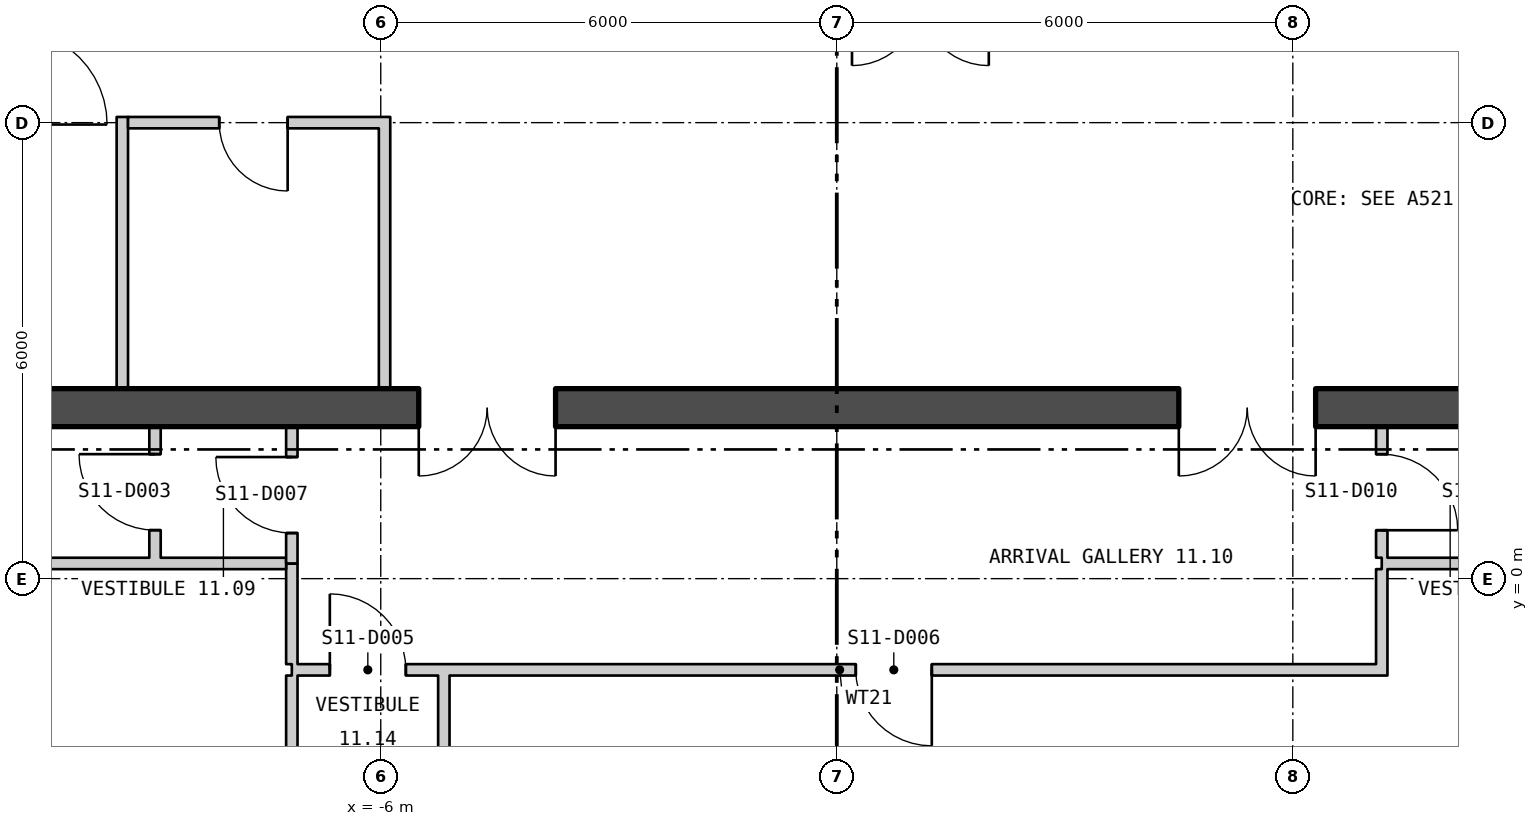
"""IFC4 building model, lengths in metres.
Left out: names, types, materials, properties, quantities, classifications, styles, units other than length and angle.
Written with IfcOpenShell. Run it as: python <this file> out.ifc"""

import sys

from ifc_helpers import new_model, si_unit, direction, frame, frame_2d, origin, place, context, subcontext, project, spatial, polyline, rectangle, outline, extrude, element, fill, save


model = new_model("IFC4")
c1 = context("Model", 3, precision=1e-05, world=origin(), true_north=direction((0.0, 1.0)))
c2 = subcontext(c1, "Body", "Model", "MODEL_VIEW")
j1 = project(units=[si_unit("LENGTHUNIT", "METRE"), si_unit("PLANEANGLEUNIT", "RADIAN")], contexts=[c1])
p1 = place(None, origin())
s1 = spatial("IfcSite", under=j1, at=p1, CompositionType="ELEMENT")
p2 = place(p1, origin())
s2 = spatial("IfcBuilding", under=s1, at=p2, CompositionType="ELEMENT")
p3 = place(p2, frame((0.0, 0.0, 151.5)))
s3 = spatial("IfcBuildingStorey", under=s2, at=p3, CompositionType="ELEMENT", Elevation=151.5)
p4 = place(p3, frame((-27.075, 12.683, -0.18), z_axis=(0.0, 0.0, 1.0), x_axis=(0.500000141277, -0.866025322218, 0.0)))
e1 = element("IfcWall", 1, at=p4, inside=s3, PredefinedType="SOLIDWALL", context=c2, shape_type="SweptSolid", body=[
    extrude(outline(polyline([(-0.13, -0.225), (45.86, -0.225), (45.6, 0.225), (0.13, 0.225), (-0.13, -0.225)])), origin(), (0.0, 0.0, 1.0), 3.68),
])
p5 = place(p4, frame((1.424, 0.0, 1.08)))
e2 = element("IfcOpeningElement", 2, at=p5, cuts=e1, PredefinedType="OPENING", context=c2, shape_type="SweptSolid", body=[
    extrude(rectangle(XDim=2.4, YDim=2.0, at=frame_2d((1.2, 1.0))), frame((0.0, 0.235, 0.0), z_axis=(0.0, -1.0, 0.0), x_axis=(1.0, 0.0, 0.0)), (0.0, 0.0, 1.0), 0.47),
])
p6 = place(p4, frame((5.892, 0.0, 1.08)))
e3 = element("IfcOpeningElement", 3, at=p6, cuts=e1, PredefinedType="OPENING", context=c2, shape_type="SweptSolid", body=[
    extrude(rectangle(XDim=2.4, YDim=2.0, at=frame_2d((1.2, 1.0))), frame((0.0, 0.235, 0.0), z_axis=(0.0, -1.0, 0.0), x_axis=(1.0, 0.0, 0.0)), (0.0, 0.0, 1.0), 0.47),
])
p7 = place(p4, frame((10.399, 0.0, 1.08)))
e4 = element("IfcOpeningElement", 4, at=p7, cuts=e1, PredefinedType="OPENING", context=c2, shape_type="SweptSolid", body=[
    extrude(rectangle(XDim=2.4, YDim=2.0, at=frame_2d((1.2, 1.0))), frame((0.0, 0.235, 0.0), z_axis=(0.0, -1.0, 0.0), x_axis=(1.0, 0.0, 0.0)), (0.0, 0.0, 1.0), 0.47),
])
p8 = place(p4, frame((14.905, 0.0, 1.08)))
e5 = element("IfcOpeningElement", 5, at=p8, cuts=e1, PredefinedType="OPENING", context=c2, shape_type="SweptSolid", body=[
    extrude(rectangle(XDim=2.4, YDim=2.0, at=frame_2d((1.2, 1.0))), frame((0.0, 0.235, 0.0), z_axis=(0.0, -1.0, 0.0), x_axis=(1.0, 0.0, 0.0)), (0.0, 0.0, 1.0), 0.47),
])
p9 = place(p4, frame((19.412, 0.0, 1.08)))
e6 = element("IfcOpeningElement", 6, at=p9, cuts=e1, PredefinedType="OPENING", context=c2, shape_type="SweptSolid", body=[
    extrude(rectangle(XDim=2.4, YDim=2.0, at=frame_2d((1.2, 1.0))), frame((0.0, 0.235, 0.0), z_axis=(0.0, -1.0, 0.0), x_axis=(1.0, 0.0, 0.0)), (0.0, 0.0, 1.0), 0.47),
])
p10 = place(p4, frame((23.918, 0.0, 1.08)))
e7 = element("IfcOpeningElement", 7, at=p10, cuts=e1, PredefinedType="OPENING", context=c2, shape_type="SweptSolid", body=[
    extrude(rectangle(XDim=2.4, YDim=2.0, at=frame_2d((1.2, 1.0))), frame((0.0, 0.235, 0.0), z_axis=(0.0, -1.0, 0.0), x_axis=(1.0, 0.0, 0.0)), (0.0, 0.0, 1.0), 0.47),
])
p11 = place(p4, frame((28.425, 0.0, 1.08)))
e8 = element("IfcOpeningElement", 8, at=p11, cuts=e1, PredefinedType="OPENING", context=c2, shape_type="SweptSolid", body=[
    extrude(rectangle(XDim=2.4, YDim=2.0, at=frame_2d((1.2, 1.0))), frame((0.0, 0.235, 0.0), z_axis=(0.0, -1.0, 0.0), x_axis=(1.0, 0.0, 0.0)), (0.0, 0.0, 1.0), 0.47),
])
p12 = place(p4, frame((32.932, 0.0, 1.08)))
e9 = element("IfcOpeningElement", 9, at=p12, cuts=e1, PredefinedType="OPENING", context=c2, shape_type="SweptSolid", body=[
    extrude(rectangle(XDim=2.4, YDim=2.0, at=frame_2d((1.2, 1.0))), frame((0.0, 0.235, 0.0), z_axis=(0.0, -1.0, 0.0), x_axis=(1.0, 0.0, 0.0)), (0.0, 0.0, 1.0), 0.47),
])
p13 = place(p4, frame((37.438, 0.0, 1.08)))
e10 = element("IfcOpeningElement", 10, at=p13, cuts=e1, PredefinedType="OPENING", context=c2, shape_type="SweptSolid", body=[
    extrude(rectangle(XDim=2.4, YDim=2.0, at=frame_2d((1.2, 1.0))), frame((0.0, 0.235, 0.0), z_axis=(0.0, -1.0, 0.0), x_axis=(1.0, 0.0, 0.0)), (0.0, 0.0, 1.0), 0.47),
])
p14 = place(p4, frame((41.907, 0.0, 1.08)))
e11 = element("IfcOpeningElement", 11, at=p14, cuts=e1, PredefinedType="OPENING", context=c2, shape_type="SweptSolid", body=[
    extrude(rectangle(XDim=2.4, YDim=2.0, at=frame_2d((1.2, 1.0))), frame((0.0, 0.235, 0.0), z_axis=(0.0, -1.0, 0.0), x_axis=(1.0, 0.0, 0.0)), (0.0, 0.0, 1.0), 0.47),
])
p15 = place(p3, frame((4.21, -26.921, -0.18), z_axis=(0.0, 0.0, 1.0), x_axis=(0.500000141277, 0.866025322218, 0.0)))
e12 = element("IfcWall", 12, at=p15, inside=s3, PredefinedType="SOLIDWALL", context=c2, shape_type="SweptSolid", body=[
    extrude(outline(polyline([(-0.13, -0.225), (45.86, -0.225), (45.6, 0.225), (0.13, 0.225), (-0.13, -0.225)])), origin(), (0.0, 0.0, 1.0), 3.68),
])
p16 = place(p15, frame((1.424, 0.0, 1.08)))
e13 = element("IfcOpeningElement", 13, at=p16, cuts=e12, PredefinedType="OPENING", context=c2, shape_type="SweptSolid", body=[
    extrude(rectangle(XDim=2.4, YDim=2.0, at=frame_2d((1.2, 1.0))), frame((0.0, 0.235, 0.0), z_axis=(0.0, -1.0, 0.0), x_axis=(1.0, 0.0, 0.0)), (0.0, 0.0, 1.0), 0.47),
])
p17 = place(p15, frame((5.892, 0.0, 1.08)))
e14 = element("IfcOpeningElement", 14, at=p17, cuts=e12, PredefinedType="OPENING", context=c2, shape_type="SweptSolid", body=[
    extrude(rectangle(XDim=2.4, YDim=2.0, at=frame_2d((1.2, 1.0))), frame((0.0, 0.235, 0.0), z_axis=(0.0, -1.0, 0.0), x_axis=(1.0, 0.0, 0.0)), (0.0, 0.0, 1.0), 0.47),
])
p18 = place(p15, frame((10.399, 0.0, 1.08)))
e15 = element("IfcOpeningElement", 15, at=p18, cuts=e12, PredefinedType="OPENING", context=c2, shape_type="SweptSolid", body=[
    extrude(rectangle(XDim=2.4, YDim=2.0, at=frame_2d((1.2, 1.0))), frame((0.0, 0.235, 0.0), z_axis=(0.0, -1.0, 0.0), x_axis=(1.0, 0.0, 0.0)), (0.0, 0.0, 1.0), 0.47),
])
p19 = place(p15, frame((14.905, 0.0, 1.08)))
e16 = element("IfcOpeningElement", 16, at=p19, cuts=e12, PredefinedType="OPENING", context=c2, shape_type="SweptSolid", body=[
    extrude(rectangle(XDim=2.4, YDim=2.0, at=frame_2d((1.2, 1.0))), frame((0.0, 0.235, 0.0), z_axis=(0.0, -1.0, 0.0), x_axis=(1.0, 0.0, 0.0)), (0.0, 0.0, 1.0), 0.47),
])
p20 = place(p15, frame((19.412, 0.0, 1.08)))
e17 = element("IfcOpeningElement", 17, at=p20, cuts=e12, PredefinedType="OPENING", context=c2, shape_type="SweptSolid", body=[
    extrude(rectangle(XDim=2.4, YDim=2.0, at=frame_2d((1.2, 1.0))), frame((0.0, 0.235, 0.0), z_axis=(0.0, -1.0, 0.0), x_axis=(1.0, 0.0, 0.0)), (0.0, 0.0, 1.0), 0.47),
])
p21 = place(p15, frame((23.918, 0.0, 1.08)))
e18 = element("IfcOpeningElement", 18, at=p21, cuts=e12, PredefinedType="OPENING", context=c2, shape_type="SweptSolid", body=[
    extrude(rectangle(XDim=2.4, YDim=2.0, at=frame_2d((1.2, 1.0))), frame((0.0, 0.235, 0.0), z_axis=(0.0, -1.0, 0.0), x_axis=(1.0, 0.0, 0.0)), (0.0, 0.0, 1.0), 0.47),
])
p22 = place(p15, frame((37.438, 0.0, 1.08)))
e19 = element("IfcOpeningElement", 19, at=p22, cuts=e12, PredefinedType="OPENING", context=c2, shape_type="SweptSolid", body=[
    extrude(rectangle(XDim=2.4, YDim=2.0, at=frame_2d((1.2, 1.0))), frame((0.0, 0.235, 0.0), z_axis=(0.0, -1.0, 0.0), x_axis=(1.0, 0.0, 0.0)), (0.0, 0.0, 1.0), 0.47),
])
p23 = place(p15, frame((41.907, 0.0, 1.08)))
e20 = element("IfcOpeningElement", 20, at=p23, cuts=e12, PredefinedType="OPENING", context=c2, shape_type="SweptSolid", body=[
    extrude(rectangle(XDim=2.4, YDim=2.0, at=frame_2d((1.2, 1.0))), frame((0.0, 0.235, 0.0), z_axis=(0.0, -1.0, 0.0), x_axis=(1.0, 0.0, 0.0)), (0.0, 0.0, 1.0), 0.47),
])
p24 = place(p3, frame((-16.2, 2.25, 0.0), z_axis=(0.0, 0.0, 1.0), x_axis=(1.0, 0.0, 0.0)))
e21 = element("IfcWall", 21, at=p24, inside=s3, PredefinedType="SHEAR", context=c2, shape_type="SweptSolid", body=[
    extrude(rectangle(XDim=32.4, YDim=0.5, at=frame_2d((16.2, 0.0))), origin(), (0.0, 0.0, 1.0), 3.7),
])
p25 = place(p24, frame((10.7, 0.0, 0.0)))
e22 = element("IfcOpeningElement", 22, at=p25, cuts=e21, PredefinedType="OPENING", context=c2, shape_type="SweptSolid", body=[
    extrude(rectangle(XDim=1.8, YDim=2.4, at=frame_2d((0.9, 1.2))), frame((0.0, 0.26, 0.0), z_axis=(0.0, -1.0, 0.0), x_axis=(1.0, 0.0, 0.0)), (0.0, 0.0, 1.0), 0.52),
])
p26 = place(p24, frame((20.7, 0.0, 0.0)))
e23 = element("IfcOpeningElement", 23, at=p26, cuts=e21, PredefinedType="OPENING", context=c2, shape_type="SweptSolid", body=[
    extrude(rectangle(XDim=1.8, YDim=2.4, at=frame_2d((0.9, 1.2))), frame((0.0, 0.26, 0.0), z_axis=(0.0, -1.0, 0.0), x_axis=(1.0, 0.0, 0.0)), (0.0, 0.0, 1.0), 0.52),
])
for number, where, z_axis, x_axis in (
    (24, (-9.4, 2.5, 0.0), (0.0, 0.0, 1.0), (0.0, 1.0, 0.0)),
    (25, (-5.95, 2.5, 0.0), (0.0, 0.0, 1.0), (0.0, 1.0, 0.0)),
):
    element("IfcWall", number, at=place(p3, frame(where, z_axis=z_axis, x_axis=x_axis)), inside=s3, PredefinedType="PARTITIONING", context=c2, shape_type="SweptSolid", body=[
        extrude(rectangle(XDim=3.575, YDim=0.15, at=frame_2d((1.788, 0.0))), origin(), (0.0, 0.0, 1.0), 3.7),
    ])
p27 = place(p3, frame((-9.325, 6.0, 0.0), z_axis=(0.0, 0.0, 1.0), x_axis=(1.0, 0.0, 0.0)))
e26 = element("IfcWall", 26, at=p27, inside=s3, PredefinedType="PARTITIONING", context=c2, shape_type="SweptSolid", body=[
    extrude(rectangle(XDim=3.3, YDim=0.15, at=frame_2d((1.65, 0.0))), origin(), (0.0, 0.0, 1.0), 3.7),
])
p28 = place(p27, frame((1.2, 0.0, 0.0)))
e27 = element("IfcOpeningElement", 27, at=p28, cuts=e26, PredefinedType="OPENING", context=c2, shape_type="SweptSolid", body=[
    extrude(rectangle(XDim=0.9, YDim=2.1, at=frame_2d((0.45, 1.05))), frame((0.0, 0.085, 0.0), z_axis=(0.0, -1.0, 0.0), x_axis=(1.0, 0.0, 0.0)), (0.0, 0.0, 1.0), 0.17),
])
p29 = place(p3, frame((-17.925, 0.2, 0.0), z_axis=(0.0, 0.0, 1.0), x_axis=(1.0, 0.0, 0.0)))
e28 = element("IfcWall", 28, at=p29, inside=s3, PredefinedType="PARTITIONING", context=c2, shape_type="SweptSolid", body=[
    extrude(rectangle(XDim=10.68, YDim=0.15, at=frame_2d((5.34, 0.0))), origin(), (0.0, 0.0, 1.0), 3.7),
])
p30 = place(p29, frame((0.312, 0.0, 0.0)))
e29 = element("IfcOpeningElement", 29, at=p30, cuts=e28, PredefinedType="OPENING", context=c2, shape_type="SweptSolid", body=[
    extrude(rectangle(XDim=1.0, YDim=2.1, at=frame_2d((0.5, 1.05))), frame((0.0, 0.085, 0.0), z_axis=(0.0, -1.0, 0.0), x_axis=(1.0, 0.0, 0.0)), (0.0, 0.0, 1.0), 0.17),
])
p31 = place(p3, frame((-8.97, 0.275, 0.0), z_axis=(0.0, 0.0, 1.0), x_axis=(0.0, 1.0, 0.0)))
e30 = element("IfcWall", 30, at=p31, inside=s3, PredefinedType="PARTITIONING", context=c2, shape_type="SweptSolid", body=[
    extrude(rectangle(XDim=1.725, YDim=0.15, at=frame_2d((0.863, 0.0))), origin(), (0.0, 0.0, 1.0), 3.7),
])
p32 = place(p31, frame((0.363, 0.0, 0.0)))
e31 = element("IfcOpeningElement", 31, at=p32, cuts=e30, PredefinedType="OPENING", context=c2, shape_type="SweptSolid", body=[
    extrude(rectangle(XDim=1.0, YDim=2.1, at=frame_2d((0.5, 1.05))), frame((0.0, 0.085, 0.0), z_axis=(0.0, -1.0, 0.0), x_axis=(1.0, 0.0, 0.0)), (0.0, 0.0, 1.0), 0.17),
])
p33 = place(p3, frame((-7.17, -3.46, 0.0), z_axis=(0.0, 0.0, 1.0), x_axis=(0.0, 1.0, 0.0)))
e32 = element("IfcWall", 32, at=p33, inside=s3, PredefinedType="PARTITIONING", context=c2, shape_type="SweptSolid", body=[
    extrude(rectangle(XDim=2.185, YDim=0.15, at=frame_2d((1.093, 0.0))), origin(), (0.0, 0.0, 1.0), 3.7),
])
p34 = place(p3, frame((-7.17, -1.2, 0.0), z_axis=(0.0, 0.0, 1.0), x_axis=(1.0, 0.0, 0.0)))
e33 = element("IfcWall", 33, at=p34, inside=s3, PredefinedType="PARTITIONING", context=c2, shape_type="SweptSolid", body=[
    extrude(rectangle(XDim=14.415, YDim=0.15, at=frame_2d((7.207, 0.0))), origin(), (0.0, 0.0, 1.0), 3.7),
])
p35 = place(p34, frame((0.5, 0.0, 0.0)))
e34 = element("IfcOpeningElement", 34, at=p35, cuts=e33, PredefinedType="OPENING", context=c2, shape_type="SweptSolid", body=[
    extrude(rectangle(XDim=1.0, YDim=2.1, at=frame_2d((0.5, 1.05))), frame((0.0, 0.085, 0.0), z_axis=(0.0, -1.0, 0.0), x_axis=(1.0, 0.0, 0.0)), (0.0, 0.0, 1.0), 0.17),
])
p36 = place(p34, frame((7.42, 0.0, 0.0)))
e35 = element("IfcOpeningElement", 35, at=p36, cuts=e33, PredefinedType="OPENING", context=c2, shape_type="SweptSolid", body=[
    extrude(rectangle(XDim=1.0, YDim=2.1, at=frame_2d((0.5, 1.05))), frame((0.0, 0.085, 0.0), z_axis=(0.0, -1.0, 0.0), x_axis=(1.0, 0.0, 0.0)), (0.0, 0.0, 1.0), 0.17),
])
p37 = place(p3, frame((-7.17, -1.125, 0.0), z_axis=(0.0, 0.0, 1.0), x_axis=(0.0, 1.0, 0.0)))
e36 = element("IfcWall", 36, at=p37, inside=s3, PredefinedType="PARTITIONING", context=c2, shape_type="SweptSolid", body=[
    extrude(rectangle(XDim=1.322, YDim=0.15, at=frame_2d((0.661, 0.0))), origin(), (0.0, 0.0, 1.0), 3.7),
])
p38 = place(p3, frame((-7.17, 0.2, 0.0), z_axis=(0.0, 0.0, 1.0), x_axis=(0.0, 1.0, 0.0)))
e37 = element("IfcWall", 37, at=p38, inside=s3, PredefinedType="PARTITIONING", context=c2, shape_type="SweptSolid", body=[
    extrude(rectangle(XDim=1.8, YDim=0.15, at=frame_2d((0.9, 0.0))), origin(), (0.0, 0.0, 1.0), 3.7),
])
p39 = place(p38, frame((0.4, 0.0, 0.0)))
e38 = element("IfcOpeningElement", 38, at=p39, cuts=e37, PredefinedType="OPENING", context=c2, shape_type="SweptSolid", body=[
    extrude(rectangle(XDim=1.0, YDim=2.1, at=frame_2d((0.5, 1.05))), frame((0.0, 0.085, 0.0), z_axis=(0.0, -1.0, 0.0), x_axis=(1.0, 0.0, 0.0)), (0.0, 0.0, 1.0), 0.17),
])
p40 = place(p3, frame((-5.17, -3.48, 0.0), z_axis=(0.0, 0.0, 1.0), x_axis=(0.0, 1.0, 0.0)))
e39 = element("IfcWall", 39, at=p40, inside=s3, PredefinedType="PARTITIONING", context=c2, shape_type="SweptSolid", body=[
    extrude(rectangle(XDim=2.205, YDim=0.15, at=frame_2d((1.103, 0.0))), origin(), (0.0, 0.0, 1.0), 3.7),
])
p41 = place(p3, frame((7.17, -1.125, 0.0), z_axis=(0.0, 0.0, 1.0), x_axis=(0.0, 1.0, 0.0)))
e40 = element("IfcWall", 40, at=p41, inside=s3, PredefinedType="PARTITIONING", context=c2, shape_type="SweptSolid", body=[
    extrude(rectangle(XDim=1.25, YDim=0.15, at=frame_2d((0.625, 0.0))), origin(), (0.0, 0.0, 1.0), 3.7),
])
p42 = place(p3, frame((7.17, 0.2, 0.0), z_axis=(0.0, 0.0, 1.0), x_axis=(1.0, 0.0, 0.0)))
e41 = element("IfcWall", 41, at=p42, inside=s3, PredefinedType="PARTITIONING", context=c2, shape_type="SweptSolid", body=[
    extrude(rectangle(XDim=10.755, YDim=0.15, at=frame_2d((5.378, 0.0))), origin(), (0.0, 0.0, 1.0), 3.7),
])
p43 = place(p42, frame((7.134, 0.0, 0.0)))
e42 = element("IfcOpeningElement", 42, at=p43, cuts=e41, PredefinedType="OPENING", context=c2, shape_type="SweptSolid", body=[
    extrude(rectangle(XDim=1.0, YDim=2.1, at=frame_2d((0.5, 1.05))), frame((0.0, 0.085, 0.0), z_axis=(0.0, -1.0, 0.0), x_axis=(1.0, 0.0, 0.0)), (0.0, 0.0, 1.0), 0.17),
])
p44 = place(p3, frame((7.17, 0.275, 0.0), z_axis=(0.0, 0.0, 1.0), x_axis=(0.0, 1.0, 0.0)))
e43 = element("IfcWall", 43, at=p44, inside=s3, PredefinedType="PARTITIONING", context=c2, shape_type="SweptSolid", body=[
    extrude(rectangle(XDim=1.725, YDim=0.15, at=frame_2d((0.863, 0.0))), origin(), (0.0, 0.0, 1.0), 3.7),
])
p45 = place(p44, frame((0.362, 0.0, 0.0)))
e44 = element("IfcOpeningElement", 44, at=p45, cuts=e43, PredefinedType="OPENING", context=c2, shape_type="SweptSolid", body=[
    extrude(rectangle(XDim=1.0, YDim=2.1, at=frame_2d((0.5, 1.05))), frame((0.0, 0.085, 0.0), z_axis=(0.0, -1.0, 0.0), x_axis=(1.0, 0.0, 0.0)), (0.0, 0.0, 1.0), 0.17),
])
p46 = place(p28, origin())
e45 = element("IfcDoor", 45, at=p46, inside=s3, OperationType="SINGLE_SWING_RIGHT", PredefinedType="DOOR", context=c2, shape_type="SweptSolid", body=[
    extrude(rectangle(XDim=0.9, YDim=2.1, at=frame_2d((0.45, 1.05))), frame((0.0, 0.025, 0.0), z_axis=(0.0, -1.0, 0.0), x_axis=(1.0, 0.0, 0.0)), (0.0, 0.0, 1.0), 0.05),
])
fill(e27, e45)
p47 = place(p25, origin())
e46 = element("IfcDoor", 46, at=p47, inside=s3, OperationType="DOUBLE_DOOR_SINGLE_SWING", PredefinedType="DOOR", context=c2, shape_type="SweptSolid", body=[
    extrude(rectangle(XDim=1.8, YDim=2.4, at=frame_2d((0.9, 1.2))), frame((0.0, 0.025, 0.0), z_axis=(0.0, -1.0, 0.0), x_axis=(1.0, 0.0, 0.0)), (0.0, 0.0, 1.0), 0.05),
])
fill(e22, e46)
p48 = place(p26, origin())
e47 = element("IfcDoor", 47, at=p48, inside=s3, OperationType="DOUBLE_DOOR_SINGLE_SWING", PredefinedType="DOOR", context=c2, shape_type="SweptSolid", body=[
    extrude(rectangle(XDim=1.8, YDim=2.4, at=frame_2d((0.9, 1.2))), frame((0.0, 0.025, 0.0), z_axis=(0.0, -1.0, 0.0), x_axis=(1.0, 0.0, 0.0)), (0.0, 0.0, 1.0), 0.05),
])
fill(e23, e47)
p49 = place(p32, origin())
e48 = element("IfcDoor", 48, at=p49, inside=s3, OperationType="SINGLE_SWING_LEFT", PredefinedType="DOOR", context=c2, shape_type="SweptSolid", body=[
    extrude(rectangle(XDim=1.0, YDim=2.1, at=frame_2d((0.5, 1.05))), frame((0.0, 0.025, 0.0), z_axis=(0.0, -1.0, 0.0), x_axis=(1.0, 0.0, 0.0)), (0.0, 0.0, 1.0), 0.05),
])
fill(e31, e48)
p50 = place(p35, origin())
e49 = element("IfcDoor", 49, at=p50, inside=s3, OperationType="SINGLE_SWING_RIGHT", PredefinedType="DOOR", context=c2, shape_type="SweptSolid", body=[
    extrude(rectangle(XDim=1.0, YDim=2.1, at=frame_2d((0.5, 1.05))), frame((0.0, 0.025, 0.0), z_axis=(0.0, -1.0, 0.0), x_axis=(1.0, 0.0, 0.0)), (0.0, 0.0, 1.0), 0.05),
])
fill(e34, e49)
p51 = place(p36, origin())
e50 = element("IfcDoor", 50, at=p51, inside=s3, OperationType="SINGLE_SWING_RIGHT", PredefinedType="DOOR", context=c2, shape_type="SweptSolid", body=[
    extrude(rectangle(XDim=1.0, YDim=2.1, at=frame_2d((0.5, 1.05))), frame((0.0, 0.025, 0.0), z_axis=(0.0, -1.0, 0.0), x_axis=(1.0, 0.0, 0.0)), (0.0, 0.0, 1.0), 0.05),
])
fill(e35, e50)
p52 = place(p39, origin())
e51 = element("IfcDoor", 51, at=p52, inside=s3, OperationType="SINGLE_SWING_LEFT", PredefinedType="DOOR", context=c2, shape_type="SweptSolid", body=[
    extrude(rectangle(XDim=1.0, YDim=2.1, at=frame_2d((0.5, 1.05))), frame((0.0, 0.025, 0.0), z_axis=(0.0, -1.0, 0.0), x_axis=(1.0, 0.0, 0.0)), (0.0, 0.0, 1.0), 0.05),
])
fill(e38, e51)
p53 = place(p45, origin())
e52 = element("IfcDoor", 52, at=p53, inside=s3, OperationType="SINGLE_SWING_LEFT", PredefinedType="DOOR", context=c2, shape_type="SweptSolid", body=[
    extrude(rectangle(XDim=1.0, YDim=2.1, at=frame_2d((0.5, 1.05))), frame((0.0, 0.025, 0.0), z_axis=(0.0, -1.0, 0.0), x_axis=(1.0, 0.0, 0.0)), (0.0, 0.0, 1.0), 0.05),
])
fill(e44, e52)
save(model, sys.argv[1])
